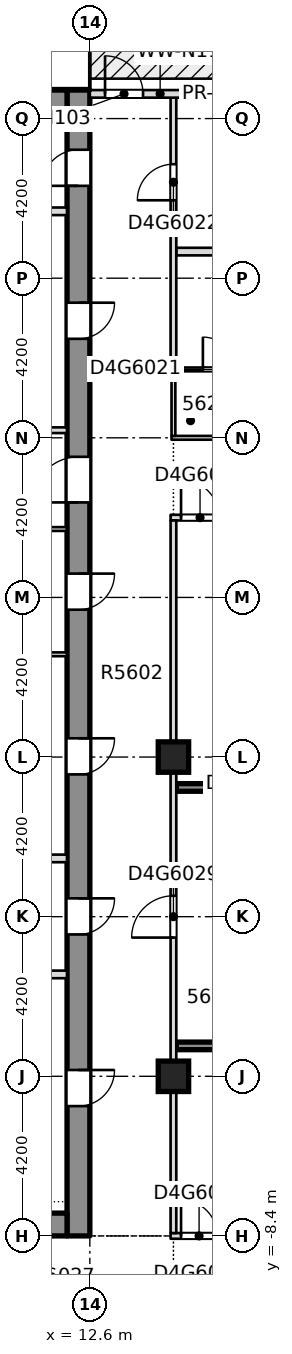
"""IFC4 building model, lengths in metres.
Left out: names, types, materials, properties, quantities, classifications, styles, units other than length and angle.
Written with IfcOpenShell. Run it as: python <this file> out.ifc"""

import sys

from ifc_helpers import new_model, si_unit, direction, frame, frame_2d, origin, origin_2d, place, context, subcontext, project, spatial, rectangle, extrude, element, fill, save


model = new_model("IFC4")
c1 = context("Model", 3, precision=1e-05, world=origin(), true_north=direction((0.0, 1.0)))
c2 = subcontext(c1, "Body", "Model", "MODEL_VIEW")
j1 = project(units=[si_unit("LENGTHUNIT", "METRE"), si_unit("PLANEANGLEUNIT", "RADIAN")], contexts=[c1])
p1 = place(None, origin())
s1 = spatial("IfcSite", under=j1, at=p1, CompositionType="ELEMENT")
p2 = place(p1, origin())
s2 = spatial("IfcBuilding", under=s1, at=p2, CompositionType="ELEMENT")
p3 = place(p2, frame((0.0, 0.0, 213.5)))
s3 = spatial("IfcBuildingStorey", under=s2, at=p3, CompositionType="ELEMENT", Elevation=213.5)
p4 = place(p3, frame((12.3, -8.4, -0.4), z_axis=(0.0, 0.0, 1.0), x_axis=(0.0, 1.0, 0.0)))
e1 = element("IfcWall", 1, at=p4, inside=s3, PredefinedType="SHEAR", context=c2, shape_type="SweptSolid", body=[
    extrude(rectangle(XDim=30.15, YDim=0.6, at=frame_2d((15.075, 0.0))), origin(), (0.0, 0.0, 1.0), 3.4),
])
p5 = place(p4, frame((3.416, 0.0, 0.4)))
e2 = element("IfcOpeningElement", 2, at=p5, cuts=e1, PredefinedType="OPENING", context=c2, shape_type="SweptSolid", body=[
    extrude(rectangle(XDim=0.95, YDim=2.1, at=frame_2d((0.475, 1.05))), frame((0.0, 0.31, 0.0), z_axis=(0.0, -1.0, 0.0), x_axis=(1.0, 0.0, 0.0)), (0.0, 0.0, 1.0), 0.62),
])
p6 = place(p4, frame((7.932, 0.0, 0.4)))
e3 = element("IfcOpeningElement", 3, at=p6, cuts=e1, PredefinedType="OPENING", context=c2, shape_type="SweptSolid", body=[
    extrude(rectangle(XDim=0.95, YDim=2.1, at=frame_2d((0.475, 1.05))), frame((0.0, 0.31, 0.0), z_axis=(0.0, -1.0, 0.0), x_axis=(1.0, 0.0, 0.0)), (0.0, 0.0, 1.0), 0.62),
])
p7 = place(p4, frame((12.144, 0.0, 0.4)))
e4 = element("IfcOpeningElement", 4, at=p7, cuts=e1, PredefinedType="OPENING", context=c2, shape_type="SweptSolid", body=[
    extrude(rectangle(XDim=0.95, YDim=2.1, at=frame_2d((0.475, 1.05))), frame((0.0, 0.31, 0.0), z_axis=(0.0, -1.0, 0.0), x_axis=(1.0, 0.0, 0.0)), (0.0, 0.0, 1.0), 0.62),
])
p8 = place(p4, frame((16.477, 0.0, 0.4)))
e5 = element("IfcOpeningElement", 5, at=p8, cuts=e1, PredefinedType="OPENING", context=c2, shape_type="SweptSolid", body=[
    extrude(rectangle(XDim=0.95, YDim=2.1, at=frame_2d((0.475, 1.05))), frame((0.0, 0.31, 0.0), z_axis=(0.0, -1.0, 0.0), x_axis=(1.0, 0.0, 0.0)), (0.0, 0.0, 1.0), 0.62),
])
p9 = place(p4, frame((23.605, 0.0, 0.4)))
e6 = element("IfcOpeningElement", 6, at=p9, cuts=e1, PredefinedType="OPENING", context=c2, shape_type="SweptSolid", body=[
    extrude(rectangle(XDim=0.95, YDim=2.1, at=frame_2d((0.475, 1.05))), frame((0.0, 0.31, 0.0), z_axis=(0.0, -1.0, 0.0), x_axis=(1.0, 0.0, 0.0)), (0.0, 0.0, 1.0), 0.62),
])
p10 = place(p4, frame((27.63, 0.0, 0.4)))
e7 = element("IfcOpeningElement", 7, at=p10, cuts=e1, PredefinedType="OPENING", context=c2, shape_type="SweptSolid", body=[
    extrude(rectangle(XDim=0.95, YDim=2.1, at=frame_2d((0.475, 1.05))), frame((0.0, 0.31, 0.0), z_axis=(0.0, -1.0, 0.0), x_axis=(1.0, 0.0, 0.0)), (0.0, 0.0, 1.0), 0.62),
])
p11 = place(p4, frame((19.3, 0.0, 0.4)))
e8 = element("IfcOpeningElement", 8, at=p11, cuts=e1, PredefinedType="OPENING", context=c2, shape_type="SweptSolid", body=[
    extrude(rectangle(XDim=1.2, YDim=2.1, at=frame_2d((0.6, 1.05))), frame((0.0, 0.31, 0.0), z_axis=(0.0, -1.0, 0.0), x_axis=(1.0, 0.0, 0.0)), (0.0, 0.0, 1.0), 0.62),
])
p12 = place(p3, frame((-12.0, -8.1, -0.4), z_axis=(0.0, 0.0, 1.0), x_axis=(1.0, 0.0, 0.0)))
e9 = element("IfcWall", 9, at=p12, inside=s3, PredefinedType="SHEAR", context=c2, shape_type="SweptSolid", body=[
    extrude(rectangle(XDim=24.0, YDim=0.6, at=frame_2d((12.0, 0.0))), origin(), (0.0, 0.0, 1.0), 3.4),
])
p13 = place(p12, frame((7.25, 0.0, 0.4)))
e10 = element("IfcOpeningElement", 10, at=p13, cuts=e9, PredefinedType="OPENING", context=c2, shape_type="SweptSolid", body=[
    extrude(rectangle(XDim=1.8, YDim=2.1, at=frame_2d((0.9, 1.05))), frame((0.0, 0.31, 0.0), z_axis=(0.0, -1.0, 0.0), x_axis=(1.0, 0.0, 0.0)), (0.0, 0.0, 1.0), 0.62),
])
p14 = place(p12, frame((14.95, 0.0, 0.4)))
e11 = element("IfcOpeningElement", 11, at=p14, cuts=e9, PredefinedType="OPENING", context=c2, shape_type="SweptSolid", body=[
    extrude(rectangle(XDim=1.8, YDim=2.1, at=frame_2d((0.9, 1.05))), frame((0.0, 0.31, 0.0), z_axis=(0.0, -1.0, 0.0), x_axis=(1.0, 0.0, 0.0)), (0.0, 0.0, 1.0), 0.62),
])
p15 = place(p3, frame((-12.0, 21.45, -0.4), z_axis=(0.0, 0.0, 1.0), x_axis=(1.0, 0.0, 0.0)))
e12 = element("IfcWall", 12, at=p15, inside=s3, PredefinedType="SHEAR", context=c2, shape_type="SweptSolid", body=[
    extrude(rectangle(XDim=24.0, YDim=0.6, at=frame_2d((12.0, 0.0))), origin(), (0.0, 0.0, 1.0), 3.4),
])
for number, where, z_axis, x_axis in (
    (13, (14.8, -4.2, -0.4), (0.0, 0.0, 1.0), (1.0, 0.0, 0.0)),
    (14, (14.8, 4.2, -0.4), (0.0, 0.0, 1.0), (1.0, 0.0, 0.0)),
):
    element("IfcColumn", number, at=place(p3, frame(where, z_axis=z_axis, x_axis=x_axis)), inside=s3, PredefinedType="COLUMN", context=c2, shape_type="SweptSolid", body=[
        extrude(rectangle(XDim=0.8, YDim=0.8, at=origin_2d()), origin(), (0.0, 0.0, 1.0), 3.85),
    ])
p16 = place(p3, frame((14.725, -8.4, 0.0), z_axis=(0.0, 0.0, 1.0), x_axis=(1.0, 0.0, 0.0)))
e15 = element("IfcWall", 15, at=p16, inside=s3, PredefinedType="PARTITIONING", context=c2, shape_type="SweptSolid", body=[
    extrude(rectangle(XDim=11.025, YDim=0.15, at=frame_2d((5.512, 0.0))), origin(), (0.0, 0.0, 1.0), 3.0),
])
p17 = place(p16, frame((0.275, 0.0, 0.0)))
e16 = element("IfcOpeningElement", 16, at=p17, cuts=e15, PredefinedType="OPENING", context=c2, shape_type="SweptSolid", body=[
    extrude(rectangle(XDim=0.95, YDim=2.1, at=frame_2d((0.475, 1.05))), frame((0.0, 0.085, 0.0), z_axis=(0.0, -1.0, 0.0), x_axis=(1.0, 0.0, 0.0)), (0.0, 0.0, 1.0), 0.17),
])
p18 = place(p3, frame((14.725, 10.5, 0.0), z_axis=(0.0, 0.0, 1.0), x_axis=(1.0, 0.0, 0.0)))
e17 = element("IfcWall", 17, at=p18, inside=s3, PredefinedType="PARTITIONING", context=c2, shape_type="SweptSolid", body=[
    extrude(rectangle(XDim=11.025, YDim=0.15, at=frame_2d((5.512, 0.0))), origin(), (0.0, 0.0, 1.0), 3.0),
])
p19 = place(p18, frame((0.275, 0.0, 0.0)))
e18 = element("IfcOpeningElement", 18, at=p19, cuts=e17, PredefinedType="OPENING", context=c2, shape_type="SweptSolid", body=[
    extrude(rectangle(XDim=1.0, YDim=2.1, at=frame_2d((0.5, 1.05))), frame((0.0, 0.085, 0.0), z_axis=(0.0, -1.0, 0.0), x_axis=(1.0, 0.0, 0.0)), (0.0, 0.0, 1.0), 0.17),
])
p20 = place(p3, frame((14.75, 12.6, 0.0), z_axis=(0.0, 0.0, 1.0), x_axis=(1.0, 0.0, 0.0)))
e19 = element("IfcWall", 19, at=p20, inside=s3, PredefinedType="PARTITIONING", context=c2, shape_type="SweptSolid", body=[
    extrude(rectangle(XDim=2.5, YDim=0.1, at=frame_2d((1.25, 0.0))), origin(), (0.0, 0.0, 1.0), 3.0),
])
p21 = place(p3, frame((14.725, 14.4, 0.0), z_axis=(0.0, 0.0, 1.0), x_axis=(1.0, 0.0, 0.0)))
e20 = element("IfcWall", 20, at=p21, inside=s3, PredefinedType="PARTITIONING", context=c2, shape_type="SweptSolid", body=[
    extrude(rectangle(XDim=2.525, YDim=0.1, at=frame_2d((1.262, 0.0))), origin(), (0.0, 0.0, 1.0), 3.0),
])
p22 = place(p21, frame((0.85, 0.0, 0.0)))
e21 = element("IfcOpeningElement", 21, at=p22, cuts=e20, PredefinedType="OPENING", context=c2, shape_type="SweptSolid", body=[
    extrude(rectangle(XDim=0.85, YDim=2.1, at=frame_2d((0.425, 1.05))), frame((0.0, 0.06, 0.0), z_axis=(0.0, -1.0, 0.0), x_axis=(1.0, 0.0, 0.0)), (0.0, 0.0, 1.0), 0.12),
])
p23 = place(p3, frame((14.875, 17.5, 0.0), z_axis=(0.0, 0.0, 1.0), x_axis=(1.0, 0.0, 0.0)))
e22 = element("IfcWall", 22, at=p23, inside=s3, PredefinedType="PARTITIONING", context=c2, shape_type="SweptSolid", body=[
    extrude(rectangle(XDim=2.475, YDim=0.2, at=frame_2d((1.238, 0.0))), origin(), (0.0, 0.0, 1.0), 3.0),
])
p24 = place(p3, frame((14.8, -8.325, 0.0), z_axis=(0.0, 0.0, 1.0), x_axis=(0.0, 1.0, 0.0)))
e23 = element("IfcWall", 23, at=p24, inside=s3, PredefinedType="PARTITIONING", context=c2, shape_type="SweptSolid", body=[
    extrude(rectangle(XDim=18.75, YDim=0.15, at=frame_2d((9.375, 0.0))), origin(), (0.0, 0.0, 1.0), 3.0),
])
p25 = place(p24, frame((7.775, 0.0, 0.0)))
e24 = element("IfcOpeningElement", 24, at=p25, cuts=e23, PredefinedType="OPENING", context=c2, shape_type="SweptSolid", body=[
    extrude(rectangle(XDim=1.1, YDim=2.1, at=frame_2d((0.55, 1.05))), frame((0.0, 0.085, 0.0), z_axis=(0.0, -1.0, 0.0), x_axis=(1.0, 0.0, 0.0)), (0.0, 0.0, 1.0), 0.17),
])
p26 = place(p3, frame((14.8, 12.65, 0.0), z_axis=(0.0, 0.0, 1.0), x_axis=(0.0, 1.0, 0.0)))
e25 = element("IfcWall", 25, at=p26, inside=s3, PredefinedType="PARTITIONING", context=c2, shape_type="SweptSolid", body=[
    extrude(rectangle(XDim=1.7, YDim=0.1, at=frame_2d((0.85, 0.0))), origin(), (0.0, 0.0, 1.0), 3.0),
])
p27 = place(p3, frame((14.8, 14.45, 0.0), z_axis=(0.0, 0.0, 1.0), x_axis=(0.0, 1.0, 0.0)))
e26 = element("IfcWall", 26, at=p27, inside=s3, PredefinedType="PARTITIONING", context=c2, shape_type="SweptSolid", body=[
    extrude(rectangle(XDim=7.1, YDim=0.15, at=frame_2d((3.55, 0.0))), origin(), (0.0, 0.0, 1.0), 3.0),
])
p28 = place(p27, frame((4.4, 0.0, 0.0)))
e27 = element("IfcOpeningElement", 27, at=p28, cuts=e26, PredefinedType="OPENING", context=c2, shape_type="SweptSolid", body=[
    extrude(rectangle(XDim=0.95, YDim=2.1, at=frame_2d((0.475, 1.05))), frame((0.0, 0.085, 0.0), z_axis=(0.0, -1.0, 0.0), x_axis=(1.0, 0.0, 0.0)), (0.0, 0.0, 1.0), 0.17),
])
p29 = place(p3, frame((16.3, 21.65, 0.0), z_axis=(0.0, 0.0, 1.0), x_axis=(-1.0, 0.0, 0.0)))
e28 = element("IfcWall", 28, at=p29, inside=s3, PredefinedType="STANDARD", context=c2, shape_type="SweptSolid", body=[
    extrude(rectangle(XDim=3.7, YDim=0.2, at=frame_2d((1.85, 0.0))), origin(), (0.0, 0.0, 1.0), 3.0),
])
p30 = place(p29, frame((2.3, 0.0, 0.0)))
e29 = element("IfcOpeningElement", 29, at=p30, cuts=e28, PredefinedType="OPENING", context=c2, shape_type="SweptSolid", body=[
    extrude(rectangle(XDim=1.0, YDim=2.4, at=frame_2d((0.5, 1.2))), frame((0.0, 0.11, 0.0), z_axis=(0.0, -1.0, 0.0), x_axis=(1.0, 0.0, 0.0)), (0.0, 0.0, 1.0), 0.22),
])
for number, where, z_axis, x_axis in (
    (30, (8.701, -1.519, 0.0), (0.0, 0.0, 1.0), (1.0, 0.0, 0.0)),
    (31, (8.701, 1.533, 0.0), (0.0, 0.0, 1.0), (1.0, 0.0, 0.0)),
):
    element("IfcWall", number, at=place(p3, frame(where, z_axis=z_axis, x_axis=x_axis)), inside=s3, PredefinedType="PARTITIONING", context=c2, shape_type="SweptSolid", body=[
        extrude(rectangle(XDim=3.298, YDim=0.2, at=frame_2d((1.649, 0.0))), origin(), (0.0, 0.0, 1.0), 3.0),
    ])
for number, where, z_axis, x_axis in (
    (32, (8.701, 6.904, 0.0), (0.0, 0.0, 1.0), (1.0, 0.0, 0.0)),
    (33, (8.701, 10.2, 0.0), (0.0, 0.0, 1.0), (1.0, 0.0, 0.0)),
):
    element("IfcWall", number, at=place(p3, frame(where, z_axis=z_axis, x_axis=x_axis)), inside=s3, PredefinedType="PARTITIONING", context=c2, shape_type="SweptSolid", body=[
        extrude(rectangle(XDim=3.298, YDim=0.1, at=frame_2d((1.649, 0.0))), origin(), (0.0, 0.0, 1.0), 3.0),
    ])
p31 = place(p3, frame((8.701, 12.8, 0.0), z_axis=(0.0, 0.0, 1.0), x_axis=(1.0, 0.0, 0.0)))
e34 = element("IfcWall", 34, at=p31, inside=s3, PredefinedType="PARTITIONING", context=c2, shape_type="SweptSolid", body=[
    extrude(rectangle(XDim=3.298, YDim=0.15, at=frame_2d((1.649, 0.0))), origin(), (0.0, 0.0, 1.0), 3.0),
])
p32 = place(p3, frame((8.701, 18.56, 0.0), z_axis=(0.0, 0.0, 1.0), x_axis=(1.0, 0.0, 0.0)))
e35 = element("IfcWall", 35, at=p32, inside=s3, PredefinedType="PARTITIONING", context=c2, shape_type="SweptSolid", body=[
    extrude(rectangle(XDim=3.298, YDim=0.2, at=frame_2d((1.649, 0.0))), origin(), (0.0, 0.0, 1.0), 3.0),
])
p33 = place(p3, frame((14.875, 3.4, 0.0), z_axis=(0.0, 0.0, 1.0), x_axis=(1.0, 0.0, 0.0)))
e36 = element("IfcWall", 36, at=p33, inside=s3, PredefinedType="SOLIDWALL", context=c2, shape_type="SweptSolid", body=[
    extrude(rectangle(XDim=5.575, YDim=0.2, at=frame_2d((2.788, 0.0))), origin(), (0.0, 0.0, 1.0), 3.0),
])
p34 = place(p3, frame((14.875, -3.4, 0.0), z_axis=(0.0, 0.0, 1.0), x_axis=(1.0, 0.0, 0.0)))
e37 = element("IfcWall", 37, at=p34, inside=s3, PredefinedType="SOLIDWALL", context=c2, shape_type="SweptSolid", body=[
    extrude(rectangle(XDim=8.125, YDim=0.2, at=frame_2d((4.062, 0.0))), origin(), (0.0, 0.0, 1.0), 3.0),
])
p35 = place(p17, origin())
e38 = element("IfcDoor", 38, at=p35, inside=s3, OperationType="SINGLE_SWING_LEFT", PredefinedType="DOOR", context=c2, shape_type="SweptSolid", body=[
    extrude(rectangle(XDim=0.95, YDim=2.1, at=frame_2d((0.475, 1.05))), frame((0.0, 0.025, 0.0), z_axis=(0.0, -1.0, 0.0), x_axis=(1.0, 0.0, 0.0)), (0.0, 0.0, 1.0), 0.05),
])
fill(e16, e38)
p36 = place(p19, origin())
e39 = element("IfcDoor", 39, at=p36, inside=s3, OperationType="SINGLE_SWING_RIGHT", PredefinedType="DOOR", context=c2, shape_type="SweptSolid", body=[
    extrude(rectangle(XDim=1.0, YDim=2.1, at=frame_2d((0.5, 1.05))), frame((0.0, 0.025, 0.0), z_axis=(0.0, -1.0, 0.0), x_axis=(1.0, 0.0, 0.0)), (0.0, 0.0, 1.0), 0.05),
])
fill(e18, e39)
p37 = place(p22, origin())
e40 = element("IfcDoor", 40, at=p37, inside=s3, OperationType="SINGLE_SWING_RIGHT", PredefinedType="DOOR", context=c2, shape_type="SweptSolid", body=[
    extrude(rectangle(XDim=0.85, YDim=2.1, at=frame_2d((0.425, 1.05))), frame((0.0, 0.025, 0.0), z_axis=(0.0, -1.0, 0.0), x_axis=(1.0, 0.0, 0.0)), (0.0, 0.0, 1.0), 0.05),
])
fill(e21, e40)
p38 = place(p28, origin())
e41 = element("IfcDoor", 41, at=p38, inside=s3, OperationType="SINGLE_SWING_RIGHT", PredefinedType="DOOR", context=c2, shape_type="SweptSolid", body=[
    extrude(rectangle(XDim=0.95, YDim=2.1, at=frame_2d((0.475, 1.05))), frame((0.0, 0.025, 0.0), z_axis=(0.0, -1.0, 0.0), x_axis=(1.0, 0.0, 0.0)), (0.0, 0.0, 1.0), 0.05),
])
fill(e27, e41)
p39 = place(p25, origin())
e42 = element("IfcDoor", 42, at=p39, inside=s3, OperationType="SINGLE_SWING_RIGHT", PredefinedType="DOOR", context=c2, shape_type="SweptSolid", body=[
    extrude(rectangle(XDim=1.1, YDim=2.1, at=frame_2d((0.55, 1.05))), frame((0.0, 0.025, 0.0), z_axis=(0.0, -1.0, 0.0), x_axis=(1.0, 0.0, 0.0)), (0.0, 0.0, 1.0), 0.05),
])
fill(e24, e42)
p40 = place(p30, origin())
e43 = element("IfcDoor", 43, at=p40, inside=s3, OperationType="SINGLE_SWING_LEFT", PredefinedType="DOOR", context=c2, shape_type="SweptSolid", body=[
    extrude(rectangle(XDim=1.0, YDim=2.4, at=frame_2d((0.5, 1.2))), frame((0.0, 0.025, 0.0), z_axis=(0.0, -1.0, 0.0), x_axis=(1.0, 0.0, 0.0)), (0.0, 0.0, 1.0), 0.05),
])
fill(e29, e43)
p41 = place(p5, origin())
e44 = element("IfcDoor", 44, at=p41, inside=s3, OperationType="SINGLE_SWING_LEFT", PredefinedType="DOOR", context=c2, shape_type="SweptSolid", body=[
    extrude(rectangle(XDim=0.95, YDim=2.1, at=frame_2d((0.475, 1.05))), frame((0.0, 0.025, 0.0), z_axis=(0.0, -1.0, 0.0), x_axis=(1.0, 0.0, 0.0)), (0.0, 0.0, 1.0), 0.05),
])
fill(e2, e44)
p42 = place(p6, origin())
e45 = element("IfcDoor", 45, at=p42, inside=s3, OperationType="SINGLE_SWING_LEFT", PredefinedType="DOOR", context=c2, shape_type="SweptSolid", body=[
    extrude(rectangle(XDim=0.95, YDim=2.1, at=frame_2d((0.475, 1.05))), frame((0.0, 0.025, 0.0), z_axis=(0.0, -1.0, 0.0), x_axis=(1.0, 0.0, 0.0)), (0.0, 0.0, 1.0), 0.05),
])
fill(e3, e45)
p43 = place(p7, origin())
e46 = element("IfcDoor", 46, at=p43, inside=s3, OperationType="SINGLE_SWING_LEFT", PredefinedType="DOOR", context=c2, shape_type="SweptSolid", body=[
    extrude(rectangle(XDim=0.95, YDim=2.1, at=frame_2d((0.475, 1.05))), frame((0.0, 0.025, 0.0), z_axis=(0.0, -1.0, 0.0), x_axis=(1.0, 0.0, 0.0)), (0.0, 0.0, 1.0), 0.05),
])
fill(e4, e46)
p44 = place(p8, origin())
e47 = element("IfcDoor", 47, at=p44, inside=s3, OperationType="SINGLE_SWING_LEFT", PredefinedType="DOOR", context=c2, shape_type="SweptSolid", body=[
    extrude(rectangle(XDim=0.95, YDim=2.1, at=frame_2d((0.475, 1.05))), frame((0.0, 0.025, 0.0), z_axis=(0.0, -1.0, 0.0), x_axis=(1.0, 0.0, 0.0)), (0.0, 0.0, 1.0), 0.05),
])
fill(e5, e47)
p45 = place(p9, origin())
e48 = element("IfcDoor", 48, at=p45, inside=s3, OperationType="SINGLE_SWING_LEFT", PredefinedType="DOOR", context=c2, shape_type="SweptSolid", body=[
    extrude(rectangle(XDim=0.95, YDim=2.1, at=frame_2d((0.475, 1.05))), frame((0.0, 0.025, 0.0), z_axis=(0.0, -1.0, 0.0), x_axis=(1.0, 0.0, 0.0)), (0.0, 0.0, 1.0), 0.05),
])
fill(e6, e48)
p46 = place(p10, origin())
e49 = element("IfcDoor", 49, at=p46, inside=s3, OperationType="SINGLE_SWING_LEFT", PredefinedType="DOOR", context=c2, shape_type="SweptSolid", body=[
    extrude(rectangle(XDim=0.95, YDim=2.1, at=frame_2d((0.475, 1.05))), frame((0.0, 0.025, 0.0), z_axis=(0.0, -1.0, 0.0), x_axis=(1.0, 0.0, 0.0)), (0.0, 0.0, 1.0), 0.05),
])
fill(e7, e49)
p47 = place(p11, origin())
e50 = element("IfcDoor", 50, at=p47, inside=s3, OperationType="SINGLE_SWING_LEFT", PredefinedType="DOOR", context=c2, shape_type="SweptSolid", body=[
    extrude(rectangle(XDim=1.2, YDim=2.1, at=frame_2d((0.6, 1.05))), frame((0.0, 0.025, 0.0), z_axis=(0.0, -1.0, 0.0), x_axis=(1.0, 0.0, 0.0)), (0.0, 0.0, 1.0), 0.05),
])
fill(e8, e50)
save(model, sys.argv[1])
